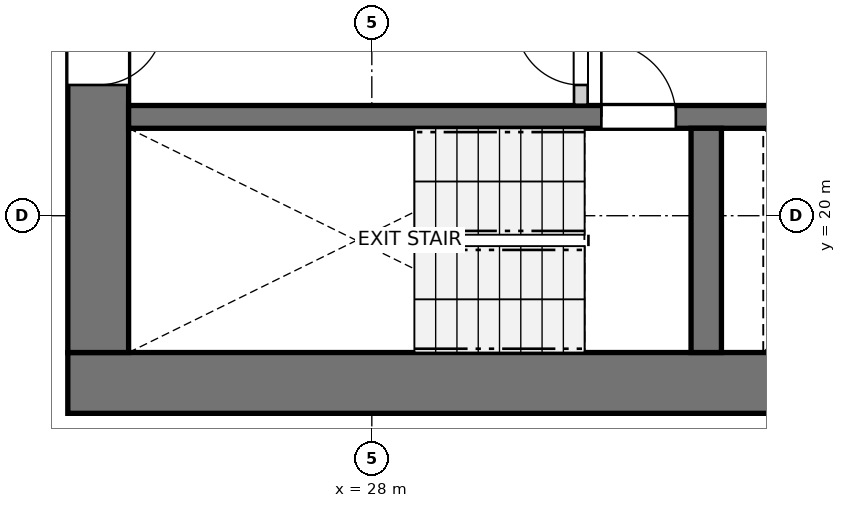
"""IFC4 building model, lengths in metres.
Left out: names, types, materials, properties, quantities, classifications, styles, units other than length and angle.
Written with IfcOpenShell. Run it as: python <this file> out.ifc"""

import sys

from ifc_helpers import new_model, si_unit, direction, frame, frame_2d, origin, place, context, subcontext, project, spatial, rectangle, extrude, source, transform, mapped, element, fill, save


model = new_model("IFC4")
c1 = context("Model", 3, precision=1e-05, world=origin(), true_north=direction((0.0, 1.0)))
c2 = subcontext(c1, "Body", "Model", "MODEL_VIEW")
j1 = project(units=[si_unit("LENGTHUNIT", "METRE"), si_unit("PLANEANGLEUNIT", "RADIAN")], contexts=[c1])
p1 = place(None, origin())
s1 = spatial("IfcSite", under=j1, at=p1, CompositionType="ELEMENT")
p2 = place(p1, origin())
s2 = spatial("IfcBuilding", under=s1, at=p2, CompositionType="ELEMENT")
p3 = place(p2, frame((0.0, 0.0, 11.0)))
s3 = spatial("IfcBuildingStorey", under=s2, at=p3, CompositionType="ELEMENT", Elevation=11.0)
p4 = place(p3, frame((24.0, 17.8, 0.0), z_axis=(0.0, 0.0, 1.0), x_axis=(1.0, 0.0, 0.0)))
e1 = element("IfcWall", 1, at=p4, inside=s3, PredefinedType="SHEAR", context=c2, shape_type="SweptSolid", body=[
    extrude(rectangle(XDim=12.7, YDim=0.8, at=frame_2d((6.35, 0.0))), origin(), (0.0, 0.0, 1.0), 2.94),
])
p5 = place(p3, frame((24.4, 33.8, 0.0), z_axis=(0.0, 0.0, 1.0), x_axis=(0.0, -1.0, 0.0)))
e2 = element("IfcWall", 2, at=p5, inside=s3, PredefinedType="SHEAR", context=c2, shape_type="SweptSolid", body=[
    extrude(rectangle(XDim=15.6, YDim=0.8, at=frame_2d((7.8, 0.0))), origin(), (0.0, 0.0, 1.0), 2.94),
])
p6 = place(p5, frame((7.05, 0.0, 0.0)))
e3 = element("IfcOpeningElement", 3, at=p6, cuts=e2, PredefinedType="OPENING", context=c2, shape_type="SweptSolid", body=[
    extrude(rectangle(XDim=1.5, YDim=2.15, at=frame_2d((0.75, 1.075))), frame((0.0, 0.41, 0.0), z_axis=(0.0, -1.0, 0.0), x_axis=(1.0, 0.0, 0.0)), (0.0, 0.0, 1.0), 0.82),
])
p7 = place(p5, frame((3.52, 0.0, 0.0)))
e4 = element("IfcOpeningElement", 4, at=p7, cuts=e2, PredefinedType="OPENING", context=c2, shape_type="SweptSolid", body=[
    extrude(rectangle(XDim=0.86, YDim=2.05, at=frame_2d((0.43, 1.025))), frame((0.0, 0.41, 0.0), z_axis=(0.0, -1.0, 0.0), x_axis=(1.0, 0.0, 0.0)), (0.0, 0.0, 1.0), 0.82),
])
p8 = place(p5, frame((11.22, 0.0, 0.0)))
e5 = element("IfcOpeningElement", 5, at=p8, cuts=e2, PredefinedType="OPENING", context=c2, shape_type="SweptSolid", body=[
    extrude(rectangle(XDim=0.86, YDim=2.05, at=frame_2d((0.43, 1.025))), frame((0.0, 0.41, 0.0), z_axis=(0.0, -1.0, 0.0), x_axis=(1.0, 0.0, 0.0)), (0.0, 0.0, 1.0), 0.82),
])
p9 = place(p3, frame((24.8, 21.3, 0.0), z_axis=(0.0, 0.0, 1.0), x_axis=(1.0, 0.0, 0.0)))
e6 = element("IfcWall", 6, at=p9, inside=s3, PredefinedType="SHEAR", context=c2, shape_type="SweptSolid", body=[
    extrude(rectangle(XDim=11.1, YDim=0.3, at=frame_2d((5.55, 0.0))), origin(), (0.0, 0.0, 1.0), 2.94),
])
p10 = place(p9, frame((6.22, 0.0, 0.0)))
e7 = element("IfcOpeningElement", 7, at=p10, cuts=e6, PredefinedType="OPENING", context=c2, shape_type="SweptSolid", body=[
    extrude(rectangle(XDim=0.98, YDim=2.15, at=frame_2d((0.49, 1.075))), frame((0.0, 0.16, 0.0), z_axis=(0.0, -1.0, 0.0), x_axis=(1.0, 0.0, 0.0)), (0.0, 0.0, 1.0), 0.32),
])
p11 = place(p9, frame((9.15, 0.0, 0.0)))
e8 = element("IfcOpeningElement", 8, at=p11, cuts=e6, PredefinedType="OPENING", context=c2, shape_type="SweptSolid", body=[
    extrude(rectangle(XDim=1.15, YDim=2.15, at=frame_2d((0.575, 1.075))), frame((0.0, 0.16, 0.0), z_axis=(0.0, -1.0, 0.0), x_axis=(1.0, 0.0, 0.0)), (0.0, 0.0, 1.0), 0.32),
])
p12 = place(p3, frame((32.4, 18.2, 0.0), z_axis=(0.0, 0.0, 1.0), x_axis=(0.0, 1.0, 0.0)))
e9 = element("IfcWall", 9, at=p12, inside=s3, PredefinedType="SHEAR", context=c2, shape_type="SweptSolid", body=[
    extrude(rectangle(XDim=2.95, YDim=0.4, at=frame_2d((1.475, 0.0))), origin(), (0.0, 0.0, 1.0), 2.94),
])
p13 = place(p3, frame((30.75, 21.46, 0.0), z_axis=(0.0, 0.0, 1.0), x_axis=(0.0, 1.0, 0.0)))
e10 = element("IfcWall", 10, at=p13, inside=s3, PredefinedType="PARTITIONING", context=c2, shape_type="SweptSolid", body=[
    extrude(rectangle(XDim=3.11, YDim=0.18, at=frame_2d((1.555, 0.0))), origin(), (0.0, 0.0, 1.0), 2.94),
])
p14 = place(p13, frame((0.26, 0.0, 0.0)))
e11 = element("IfcOpeningElement", 11, at=p14, cuts=e10, PredefinedType="OPENING", context=c2, shape_type="SweptSolid", body=[
    extrude(rectangle(XDim=0.86, YDim=2.05, at=frame_2d((0.43, 1.025))), frame((0.0, 0.1, 0.0), z_axis=(0.0, -1.0, 0.0), x_axis=(1.0, 0.0, 0.0)), (0.0, 0.0, 1.0), 0.2),
])
m1 = source(origin(), c2, "Body", "SweptSolid", [
    extrude(rectangle(XDim=0.98, YDim=2.15, at=frame_2d((0.49, 1.075))), frame((0.0, 0.025, 0.0), z_axis=(0.0, -1.0, 0.0), x_axis=(1.0, 0.0, 0.0)), (0.0, 0.0, 1.0), 0.05),
])
p15 = place(p10, origin())
e12 = element("IfcDoor", 12, at=p15, inside=s3, OperationType="SINGLE_SWING_LEFT", PredefinedType="DOOR", context=c2, shape_type="MappedRepresentation", body=[
    mapped(m1, transform((0.0, 0.0, 0.0), x_axis=(1.0, 0.0, 0.0), y_axis=(0.0, 1.0, 0.0), z_axis=(0.0, 0.0, 1.0), scale=1.0)),
])
fill(e7, e12)
m2 = source(origin(), c2, "Body", "SweptSolid", [
    extrude(rectangle(XDim=0.86, YDim=2.05, at=frame_2d((0.43, 1.025))), frame((0.0, 0.025, 0.0), z_axis=(0.0, -1.0, 0.0), x_axis=(1.0, 0.0, 0.0)), (0.0, 0.0, 1.0), 0.05),
])
p16 = place(p8, origin())
e13 = element("IfcDoor", 13, at=p16, inside=s3, OperationType="SINGLE_SWING_LEFT", PredefinedType="DOOR", context=c2, shape_type="MappedRepresentation", body=[
    mapped(m2, transform((0.0, 0.0, 0.0), x_axis=(1.0, 0.0, 0.0), y_axis=(0.0, 1.0, 0.0), z_axis=(0.0, 0.0, 1.0), scale=1.0)),
])
fill(e5, e13)
p17 = place(p14, origin())
e14 = element("IfcDoor", 14, at=p17, inside=s3, OperationType="SINGLE_SWING_RIGHT", PredefinedType="DOOR", context=c2, shape_type="MappedRepresentation", body=[
    mapped(m2, transform((0.0, 0.0, 0.0), x_axis=(1.0, 0.0, 0.0), y_axis=(0.0, 1.0, 0.0), z_axis=(0.0, 0.0, 1.0), scale=1.0)),
])
fill(e11, e14)
save(model, sys.argv[1])
